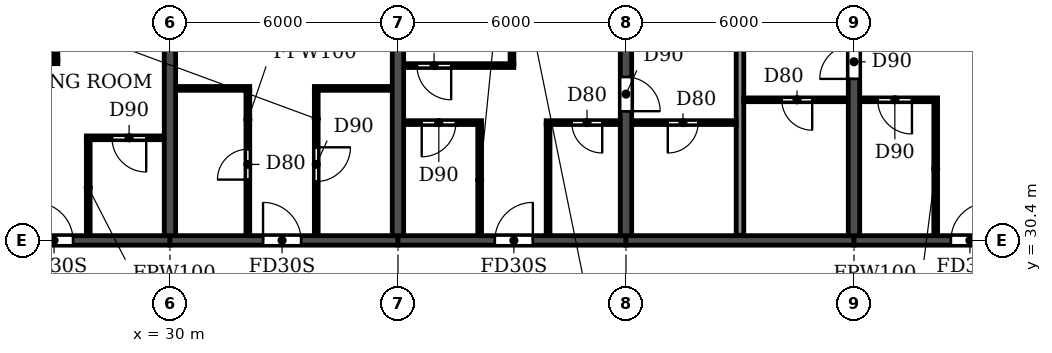
"""IFC4 building model, lengths in metres.
Left out: names, types, materials, properties, quantities, classifications, styles, units other than length and angle.
Written with IfcOpenShell. Run it as: python <this file> out.ifc"""

import sys

from ifc_helpers import new_model, si_unit, direction, frame, frame_2d, origin, place, context, subcontext, project, spatial, rectangle, extrude, element, fill, save


model = new_model("IFC4")
c1 = context("Model", 3, precision=1e-05, world=origin(), true_north=direction((0.0, 1.0)))
c2 = subcontext(c1, "Body", "Model", "MODEL_VIEW")
j1 = project(units=[si_unit("LENGTHUNIT", "METRE"), si_unit("PLANEANGLEUNIT", "RADIAN")], contexts=[c1])
p1 = place(None, origin())
s1 = spatial("IfcSite", under=j1, at=p1, CompositionType="ELEMENT")
p2 = place(p1, origin())
s2 = spatial("IfcBuilding", under=s1, at=p2, CompositionType="ELEMENT")
p3 = place(p2, frame((0.0, 0.0, 125.7)))
s3 = spatial("IfcBuildingStorey", under=s2, at=p3, CompositionType="ELEMENT", Elevation=125.7)
for number, where, z_axis, x_axis in (
    (1, (30.0, 30.525, 0.0), (0.0, 0.0, 1.0), (0.0, 1.0, 0.0)),
    (2, (36.0, 30.525, 0.0), (0.0, 0.0, 1.0), (0.0, 1.0, 0.0)),
):
    element("IfcWall", number, at=place(p3, frame(where, z_axis=z_axis, x_axis=x_axis)), inside=s3, PredefinedType="SHEAR", context=c2, shape_type="SweptSolid", body=[
        extrude(rectangle(XDim=11.675, YDim=0.3, at=frame_2d((5.837, 0.0))), origin(), (0.0, 0.0, 1.0), 3.07),
    ])
p4 = place(p3, frame((42.0, 30.525, 0.0), z_axis=(0.0, 0.0, 1.0), x_axis=(0.0, 1.0, 0.0)))
e3 = element("IfcWall", 3, at=p4, inside=s3, PredefinedType="SHEAR", context=c2, shape_type="SweptSolid", body=[
    extrude(rectangle(XDim=11.675, YDim=0.3, at=frame_2d((5.837, 0.0))), origin(), (0.0, 0.0, 1.0), 3.07),
])
p5 = place(p4, frame((3.275, 0.0, 0.0)))
e4 = element("IfcOpeningElement", 4, at=p5, cuts=e3, PredefinedType="OPENING", context=c2, shape_type="SweptSolid", body=[
    extrude(rectangle(XDim=0.9, YDim=2.1, at=frame_2d((0.45, 1.05))), frame((0.0, 0.16, 0.0), z_axis=(0.0, -1.0, 0.0), x_axis=(1.0, 0.0, 0.0)), (0.0, 0.0, 1.0), 0.32),
])
p6 = place(p3, frame((48.0, 30.525, 0.0), z_axis=(0.0, 0.0, 1.0), x_axis=(0.0, 1.0, 0.0)))
e5 = element("IfcWall", 5, at=p6, inside=s3, PredefinedType="SHEAR", context=c2, shape_type="SweptSolid", body=[
    extrude(rectangle(XDim=11.675, YDim=0.3, at=frame_2d((5.837, 0.0))), origin(), (0.0, 0.0, 1.0), 3.07),
])
p7 = place(p6, frame((4.125, 0.0, 0.0)))
e6 = element("IfcOpeningElement", 6, at=p7, cuts=e5, PredefinedType="OPENING", context=c2, shape_type="SweptSolid", body=[
    extrude(rectangle(XDim=0.9, YDim=2.1, at=frame_2d((0.45, 1.05))), frame((0.0, 0.16, 0.0), z_axis=(0.0, -1.0, 0.0), x_axis=(1.0, 0.0, 0.0)), (0.0, 0.0, 1.0), 0.32),
])
p8 = place(p3, frame((24.0, 30.4, 0.0), z_axis=(0.0, 0.0, 1.0), x_axis=(1.0, 0.0, 0.0)))
e7 = element("IfcWall", 7, at=p8, inside=s3, PredefinedType="SHEAR", context=c2, shape_type="SweptSolid", body=[
    extrude(rectangle(XDim=6.0, YDim=0.25, at=frame_2d((3.0, 0.0))), origin(), (0.0, 0.0, 1.0), 2.47),
])
p9 = place(p8, frame((2.45, 0.0, 0.0)))
e8 = element("IfcOpeningElement", 8, at=p9, cuts=e7, PredefinedType="OPENING", context=c2, shape_type="SweptSolid", body=[
    extrude(rectangle(XDim=1.0, YDim=2.1, at=frame_2d((0.5, 1.05))), frame((0.0, 0.135, 0.0), z_axis=(0.0, -1.0, 0.0), x_axis=(1.0, 0.0, 0.0)), (0.0, 0.0, 1.0), 0.27),
])
p10 = place(p3, frame((30.0, 30.4, 0.0), z_axis=(0.0, 0.0, 1.0), x_axis=(1.0, 0.0, 0.0)))
e9 = element("IfcWall", 9, at=p10, inside=s3, PredefinedType="SHEAR", context=c2, shape_type="SweptSolid", body=[
    extrude(rectangle(XDim=6.0, YDim=0.25, at=frame_2d((3.0, 0.0))), origin(), (0.0, 0.0, 1.0), 2.47),
])
p11 = place(p10, frame((2.45, 0.0, 0.0)))
e10 = element("IfcOpeningElement", 10, at=p11, cuts=e9, PredefinedType="OPENING", context=c2, shape_type="SweptSolid", body=[
    extrude(rectangle(XDim=1.0, YDim=2.1, at=frame_2d((0.5, 1.05))), frame((0.0, 0.135, 0.0), z_axis=(0.0, -1.0, 0.0), x_axis=(1.0, 0.0, 0.0)), (0.0, 0.0, 1.0), 0.27),
])
p12 = place(p3, frame((36.0, 30.4, 0.0), z_axis=(0.0, 0.0, 1.0), x_axis=(1.0, 0.0, 0.0)))
e11 = element("IfcWall", 11, at=p12, inside=s3, PredefinedType="SHEAR", context=c2, shape_type="SweptSolid", body=[
    extrude(rectangle(XDim=6.0, YDim=0.25, at=frame_2d((3.0, 0.0))), origin(), (0.0, 0.0, 1.0), 2.47),
])
p13 = place(p12, frame((2.55, 0.0, 0.0)))
e12 = element("IfcOpeningElement", 12, at=p13, cuts=e11, PredefinedType="OPENING", context=c2, shape_type="SweptSolid", body=[
    extrude(rectangle(XDim=1.0, YDim=2.1, at=frame_2d((0.5, 1.05))), frame((0.0, 0.135, 0.0), z_axis=(0.0, -1.0, 0.0), x_axis=(1.0, 0.0, 0.0)), (0.0, 0.0, 1.0), 0.27),
])
p14 = place(p3, frame((42.0, 30.4, 0.0), z_axis=(0.0, 0.0, 1.0), x_axis=(1.0, 0.0, 0.0)))
e13 = element("IfcWall", 13, at=p14, inside=s3, PredefinedType="SHEAR", context=c2, shape_type="SweptSolid", body=[
    extrude(rectangle(XDim=6.0, YDim=0.25, at=frame_2d((3.0, 0.0))), origin(), (0.0, 0.0, 1.0), 2.47),
])
p15 = place(p3, frame((48.0, 30.4, 0.0), z_axis=(0.0, 0.0, 1.0), x_axis=(1.0, 0.0, 0.0)))
e14 = element("IfcWall", 14, at=p15, inside=s3, PredefinedType="SHEAR", context=c2, shape_type="SweptSolid", body=[
    extrude(rectangle(XDim=6.0, YDim=0.25, at=frame_2d((3.0, 0.0))), origin(), (0.0, 0.0, 1.0), 2.47),
])
p16 = place(p15, frame((2.55, 0.0, 0.0)))
e15 = element("IfcOpeningElement", 15, at=p16, cuts=e14, PredefinedType="OPENING", context=c2, shape_type="SweptSolid", body=[
    extrude(rectangle(XDim=1.0, YDim=2.1, at=frame_2d((0.5, 1.05))), frame((0.0, 0.135, 0.0), z_axis=(0.0, -1.0, 0.0), x_axis=(1.0, 0.0, 0.0)), (0.0, 0.0, 1.0), 0.27),
])
p17 = place(p3, frame((45.0, 30.535, 0.0), z_axis=(0.0, 0.0, 1.0), x_axis=(0.0, 1.0, 0.0)))
e16 = element("IfcWall", 16, at=p17, inside=s3, PredefinedType="PARTITIONING", context=c2, shape_type="SweptSolid", body=[
    extrude(rectangle(XDim=11.805, YDim=0.2, at=frame_2d((5.903, 0.0))), origin(), (0.0, 0.0, 1.0), 3.07),
])
p18 = place(p3, frame((27.8, 33.1, 0.0), z_axis=(0.0, 0.0, 1.0), x_axis=(1.0, 0.0, 0.0)))
e17 = element("IfcWall", 17, at=p18, inside=s3, PredefinedType="PARTITIONING", context=c2, shape_type="SweptSolid", body=[
    extrude(rectangle(XDim=2.04, YDim=0.1, at=frame_2d((1.02, 0.0))), origin(), (0.0, 0.0, 1.0), 3.07),
])
p19 = place(p18, frame((0.675, 0.0, 0.0)))
e18 = element("IfcOpeningElement", 18, at=p19, cuts=e17, PredefinedType="OPENING", context=c2, shape_type="SweptSolid", body=[
    extrude(rectangle(XDim=0.9, YDim=2.1, at=frame_2d((0.45, 1.05))), frame((0.0, 0.06, 0.0), z_axis=(0.0, -1.0, 0.0), x_axis=(1.0, 0.0, 0.0)), (0.0, 0.0, 1.0), 0.12),
])
p20 = place(p3, frame((36.16, 33.5, 0.0), z_axis=(0.0, 0.0, 1.0), x_axis=(1.0, 0.0, 0.0)))
e19 = element("IfcWall", 19, at=p20, inside=s3, PredefinedType="PARTITIONING", context=c2, shape_type="SweptSolid", body=[
    extrude(rectangle(XDim=2.04, YDim=0.1, at=frame_2d((1.02, 0.0))), origin(), (0.0, 0.0, 1.0), 3.07),
])
p21 = place(p20, frame((0.465, 0.0, 0.0)))
e20 = element("IfcOpeningElement", 20, at=p21, cuts=e19, PredefinedType="OPENING", context=c2, shape_type="SweptSolid", body=[
    extrude(rectangle(XDim=0.9, YDim=2.1, at=frame_2d((0.45, 1.05))), frame((0.0, 0.06, 0.0), z_axis=(0.0, -1.0, 0.0), x_axis=(1.0, 0.0, 0.0)), (0.0, 0.0, 1.0), 0.12),
])
p22 = place(p3, frame((39.9, 33.5, 0.0), z_axis=(0.0, 0.0, 1.0), x_axis=(1.0, 0.0, 0.0)))
e21 = element("IfcWall", 21, at=p22, inside=s3, PredefinedType="PARTITIONING", context=c2, shape_type="SweptSolid", body=[
    extrude(rectangle(XDim=1.94, YDim=0.1, at=frame_2d((0.97, 0.0))), origin(), (0.0, 0.0, 1.0), 3.07),
])
p23 = place(p22, frame((0.675, 0.0, 0.0)))
e22 = element("IfcOpeningElement", 22, at=p23, cuts=e21, PredefinedType="OPENING", context=c2, shape_type="SweptSolid", body=[
    extrude(rectangle(XDim=0.8, YDim=2.1, at=frame_2d((0.4, 1.05))), frame((0.0, 0.06, 0.0), z_axis=(0.0, -1.0, 0.0), x_axis=(1.0, 0.0, 0.0)), (0.0, 0.0, 1.0), 0.12),
])
p24 = place(p3, frame((42.16, 33.5, 0.0), z_axis=(0.0, 0.0, 1.0), x_axis=(1.0, 0.0, 0.0)))
e23 = element("IfcWall", 23, at=p24, inside=s3, PredefinedType="PARTITIONING", context=c2, shape_type="SweptSolid", body=[
    extrude(rectangle(XDim=2.74, YDim=0.1, at=frame_2d((1.37, 0.0))), origin(), (0.0, 0.0, 1.0), 3.07),
])
p25 = place(p24, frame((0.94, 0.0, 0.0)))
e24 = element("IfcOpeningElement", 24, at=p25, cuts=e23, PredefinedType="OPENING", context=c2, shape_type="SweptSolid", body=[
    extrude(rectangle(XDim=0.8, YDim=2.1, at=frame_2d((0.4, 1.05))), frame((0.0, 0.06, 0.0), z_axis=(0.0, -1.0, 0.0), x_axis=(1.0, 0.0, 0.0)), (0.0, 0.0, 1.0), 0.12),
])
p26 = place(p3, frame((45.1, 34.1, 0.0), z_axis=(0.0, 0.0, 1.0), x_axis=(1.0, 0.0, 0.0)))
e25 = element("IfcWall", 25, at=p26, inside=s3, PredefinedType="PARTITIONING", context=c2, shape_type="SweptSolid", body=[
    extrude(rectangle(XDim=2.74, YDim=0.1, at=frame_2d((1.37, 0.0))), origin(), (0.0, 0.0, 1.0), 3.07),
])
p27 = place(p26, frame((1.0, 0.0, 0.0)))
e26 = element("IfcOpeningElement", 26, at=p27, cuts=e25, PredefinedType="OPENING", context=c2, shape_type="SweptSolid", body=[
    extrude(rectangle(XDim=0.8, YDim=2.1, at=frame_2d((0.4, 1.05))), frame((0.0, 0.06, 0.0), z_axis=(0.0, -1.0, 0.0), x_axis=(1.0, 0.0, 0.0)), (0.0, 0.0, 1.0), 0.12),
])
p28 = place(p3, frame((48.16, 34.1, 0.0), z_axis=(0.0, 0.0, 1.0), x_axis=(1.0, 0.0, 0.0)))
e27 = element("IfcWall", 27, at=p28, inside=s3, PredefinedType="PARTITIONING", context=c2, shape_type="SweptSolid", body=[
    extrude(rectangle(XDim=2.04, YDim=0.1, at=frame_2d((1.02, 0.0))), origin(), (0.0, 0.0, 1.0), 3.07),
])
p29 = place(p28, frame((0.465, 0.0, 0.0)))
e28 = element("IfcOpeningElement", 28, at=p29, cuts=e27, PredefinedType="OPENING", context=c2, shape_type="SweptSolid", body=[
    extrude(rectangle(XDim=0.9, YDim=2.1, at=frame_2d((0.45, 1.05))), frame((0.0, 0.06, 0.0), z_axis=(0.0, -1.0, 0.0), x_axis=(1.0, 0.0, 0.0)), (0.0, 0.0, 1.0), 0.12),
])
p30 = place(p3, frame((30.16, 34.4, 0.0), z_axis=(0.0, 0.0, 1.0), x_axis=(1.0, 0.0, 0.0)))
e29 = element("IfcWall", 29, at=p30, inside=s3, PredefinedType="PARTITIONING", context=c2, shape_type="SweptSolid", body=[
    extrude(rectangle(XDim=1.94, YDim=0.1, at=frame_2d((0.97, 0.0))), origin(), (0.0, 0.0, 1.0), 3.07),
])
p31 = place(p3, frame((33.8, 34.4, 0.0), z_axis=(0.0, 0.0, 1.0), x_axis=(1.0, 0.0, 0.0)))
e30 = element("IfcWall", 30, at=p31, inside=s3, PredefinedType="PARTITIONING", context=c2, shape_type="SweptSolid", body=[
    extrude(rectangle(XDim=2.04, YDim=0.1, at=frame_2d((1.02, 0.0))), origin(), (0.0, 0.0, 1.0), 3.07),
])
p32 = place(p3, frame((36.16, 35.0, 0.0), z_axis=(0.0, 0.0, 1.0), x_axis=(1.0, 0.0, 0.0)))
e31 = element("IfcWall", 31, at=p32, inside=s3, PredefinedType="PARTITIONING", context=c2, shape_type="SweptSolid", body=[
    extrude(rectangle(XDim=2.89, YDim=0.1, at=frame_2d((1.445, 0.0))), origin(), (0.0, 0.0, 1.0), 3.07),
])
p33 = place(p32, frame((0.34, 0.0, 0.0)))
e32 = element("IfcOpeningElement", 32, at=p33, cuts=e31, PredefinedType="OPENING", context=c2, shape_type="SweptSolid", body=[
    extrude(rectangle(XDim=0.9, YDim=2.1, at=frame_2d((0.45, 1.05))), frame((0.0, 0.06, 0.0), z_axis=(0.0, -1.0, 0.0), x_axis=(1.0, 0.0, 0.0)), (0.0, 0.0, 1.0), 0.12),
])
p34 = place(p3, frame((24.16, 35.1, 0.0), z_axis=(0.0, 0.0, 1.0), x_axis=(1.0, 0.0, 0.0)))
e33 = element("IfcWall", 33, at=p34, inside=s3, PredefinedType="PARTITIONING", context=c2, shape_type="SweptSolid", body=[
    extrude(rectangle(XDim=2.89, YDim=0.1, at=frame_2d((1.445, 0.0))), origin(), (0.0, 0.0, 1.0), 3.07),
])
p35 = place(p34, frame((0.34, 0.0, 0.0)))
e34 = element("IfcOpeningElement", 34, at=p35, cuts=e33, PredefinedType="OPENING", context=c2, shape_type="SweptSolid", body=[
    extrude(rectangle(XDim=0.9, YDim=2.1, at=frame_2d((0.45, 1.05))), frame((0.0, 0.06, 0.0), z_axis=(0.0, -1.0, 0.0), x_axis=(1.0, 0.0, 0.0)), (0.0, 0.0, 1.0), 0.12),
])
p36 = place(p3, frame((27.0, 35.15, 0.0), z_axis=(0.0, 0.0, 1.0), x_axis=(0.0, 1.0, 0.0)))
e35 = element("IfcWall", 35, at=p36, inside=s3, PredefinedType="PARTITIONING", context=c2, shape_type="SweptSolid", body=[
    extrude(rectangle(XDim=7.19, YDim=0.1, at=frame_2d((3.595, 0.0))), origin(), (0.0, 0.0, 1.0), 3.07),
])
p37 = place(p3, frame((27.85, 30.535, 0.0), z_axis=(0.0, 0.0, 1.0), x_axis=(0.0, 1.0, 0.0)))
e36 = element("IfcWall", 36, at=p37, inside=s3, PredefinedType="PARTITIONING", context=c2, shape_type="SweptSolid", body=[
    extrude(rectangle(XDim=2.515, YDim=0.1, at=frame_2d((1.258, 0.0))), origin(), (0.0, 0.0, 1.0), 3.07),
])
p38 = place(p3, frame((32.05, 30.535, 0.0), z_axis=(0.0, 0.0, 1.0), x_axis=(0.0, 1.0, 0.0)))
e37 = element("IfcWall", 37, at=p38, inside=s3, PredefinedType="PARTITIONING", context=c2, shape_type="SweptSolid", body=[
    extrude(rectangle(XDim=3.815, YDim=0.1, at=frame_2d((1.908, 0.0))), origin(), (0.0, 0.0, 1.0), 3.07),
])
p39 = place(p38, frame((1.465, 0.0, 0.0)))
e38 = element("IfcOpeningElement", 38, at=p39, cuts=e37, PredefinedType="OPENING", context=c2, shape_type="SweptSolid", body=[
    extrude(rectangle(XDim=0.8, YDim=2.1, at=frame_2d((0.4, 1.05))), frame((0.0, 0.06, 0.0), z_axis=(0.0, -1.0, 0.0), x_axis=(1.0, 0.0, 0.0)), (0.0, 0.0, 1.0), 0.12),
])
p40 = place(p3, frame((33.85, 30.535, 0.0), z_axis=(0.0, 0.0, 1.0), x_axis=(0.0, 1.0, 0.0)))
e39 = element("IfcWall", 39, at=p40, inside=s3, PredefinedType="PARTITIONING", context=c2, shape_type="SweptSolid", body=[
    extrude(rectangle(XDim=3.815, YDim=0.1, at=frame_2d((1.908, 0.0))), origin(), (0.0, 0.0, 1.0), 3.07),
])
p41 = place(p40, frame((1.415, 0.0, 0.0)))
e40 = element("IfcOpeningElement", 40, at=p41, cuts=e39, PredefinedType="OPENING", context=c2, shape_type="SweptSolid", body=[
    extrude(rectangle(XDim=0.9, YDim=2.1, at=frame_2d((0.45, 1.05))), frame((0.0, 0.06, 0.0), z_axis=(0.0, -1.0, 0.0), x_axis=(1.0, 0.0, 0.0)), (0.0, 0.0, 1.0), 0.12),
])
p42 = place(p3, frame((38.15, 30.535, 0.0), z_axis=(0.0, 0.0, 1.0), x_axis=(0.0, 1.0, 0.0)))
e41 = element("IfcWall", 41, at=p42, inside=s3, PredefinedType="PARTITIONING", context=c2, shape_type="SweptSolid", body=[
    extrude(rectangle(XDim=2.915, YDim=0.1, at=frame_2d((1.458, 0.0))), origin(), (0.0, 0.0, 1.0), 3.07),
])
p43 = place(p3, frame((39.0, 35.05, 0.0), z_axis=(0.0, 0.0, 1.0), x_axis=(0.0, 1.0, 0.0)))
e42 = element("IfcWall", 42, at=p43, inside=s3, PredefinedType="PARTITIONING", context=c2, shape_type="SweptSolid", body=[
    extrude(rectangle(XDim=7.29, YDim=0.1, at=frame_2d((3.645, 0.0))), origin(), (0.0, 0.0, 1.0), 3.07),
])
p44 = place(p3, frame((39.95, 30.535, 0.0), z_axis=(0.0, 0.0, 1.0), x_axis=(0.0, 1.0, 0.0)))
e43 = element("IfcWall", 43, at=p44, inside=s3, PredefinedType="PARTITIONING", context=c2, shape_type="SweptSolid", body=[
    extrude(rectangle(XDim=2.915, YDim=0.1, at=frame_2d((1.458, 0.0))), origin(), (0.0, 0.0, 1.0), 3.07),
])
p45 = place(p3, frame((50.15, 30.535, 0.0), z_axis=(0.0, 0.0, 1.0), x_axis=(0.0, 1.0, 0.0)))
e44 = element("IfcWall", 44, at=p45, inside=s3, PredefinedType="PARTITIONING", context=c2, shape_type="SweptSolid", body=[
    extrude(rectangle(XDim=3.515, YDim=0.1, at=frame_2d((1.758, 0.0))), origin(), (0.0, 0.0, 1.0), 3.07),
])
p46 = place(p9, origin())
e45 = element("IfcDoor", 45, at=p46, inside=s3, OperationType="SINGLE_SWING_LEFT", PredefinedType="DOOR", context=c2, shape_type="SweptSolid", body=[
    extrude(rectangle(XDim=1.0, YDim=2.1, at=frame_2d((0.5, 1.05))), frame((0.0, 0.025, 0.0), z_axis=(0.0, -1.0, 0.0), x_axis=(1.0, 0.0, 0.0)), (0.0, 0.0, 1.0), 0.05),
])
fill(e8, e45)
p47 = place(p19, frame((0.9, 0.0, 0.0), z_axis=(0.0, 0.0, 1.0), x_axis=(-1.0, 0.0, 0.0)))
e46 = element("IfcDoor", 46, at=p47, inside=s3, OperationType="SINGLE_SWING_LEFT", PredefinedType="DOOR", context=c2, shape_type="SweptSolid", body=[
    extrude(rectangle(XDim=0.9, YDim=2.1, at=frame_2d((0.45, 1.05))), frame((0.0, 0.025, 0.0), z_axis=(0.0, -1.0, 0.0), x_axis=(1.0, 0.0, 0.0)), (0.0, 0.0, 1.0), 0.05),
])
fill(e18, e46)
p48 = place(p39, origin())
e47 = element("IfcDoor", 47, at=p48, inside=s3, OperationType="SINGLE_SWING_LEFT", PredefinedType="DOOR", context=c2, shape_type="SweptSolid", body=[
    extrude(rectangle(XDim=0.8, YDim=2.1, at=frame_2d((0.4, 1.05))), frame((0.0, 0.025, 0.0), z_axis=(0.0, -1.0, 0.0), x_axis=(1.0, 0.0, 0.0)), (0.0, 0.0, 1.0), 0.05),
])
fill(e38, e47)
p49 = place(p11, origin())
e48 = element("IfcDoor", 48, at=p49, inside=s3, OperationType="SINGLE_SWING_LEFT", PredefinedType="DOOR", context=c2, shape_type="SweptSolid", body=[
    extrude(rectangle(XDim=1.0, YDim=2.1, at=frame_2d((0.5, 1.05))), frame((0.0, 0.025, 0.0), z_axis=(0.0, -1.0, 0.0), x_axis=(1.0, 0.0, 0.0)), (0.0, 0.0, 1.0), 0.05),
])
fill(e10, e48)
p50 = place(p41, frame((0.9, 0.0, 0.0), z_axis=(0.0, 0.0, 1.0), x_axis=(-1.0, 0.0, 0.0)))
e49 = element("IfcDoor", 49, at=p50, inside=s3, OperationType="SINGLE_SWING_LEFT", PredefinedType="DOOR", context=c2, shape_type="SweptSolid", body=[
    extrude(rectangle(XDim=0.9, YDim=2.1, at=frame_2d((0.45, 1.05))), frame((0.0, 0.025, 0.0), z_axis=(0.0, -1.0, 0.0), x_axis=(1.0, 0.0, 0.0)), (0.0, 0.0, 1.0), 0.05),
])
fill(e40, e49)
p51 = place(p25, frame((0.8, 0.0, 0.0), z_axis=(0.0, 0.0, 1.0), x_axis=(-1.0, 0.0, 0.0)))
e50 = element("IfcDoor", 50, at=p51, inside=s3, OperationType="SINGLE_SWING_RIGHT", PredefinedType="DOOR", context=c2, shape_type="SweptSolid", body=[
    extrude(rectangle(XDim=0.8, YDim=2.1, at=frame_2d((0.4, 1.05))), frame((0.0, 0.025, 0.0), z_axis=(0.0, -1.0, 0.0), x_axis=(1.0, 0.0, 0.0)), (0.0, 0.0, 1.0), 0.05),
])
fill(e24, e50)
p52 = place(p33, frame((0.9, 0.0, 0.0), z_axis=(0.0, 0.0, 1.0), x_axis=(-1.0, 0.0, 0.0)))
e51 = element("IfcDoor", 51, at=p52, inside=s3, OperationType="SINGLE_SWING_LEFT", PredefinedType="DOOR", context=c2, shape_type="SweptSolid", body=[
    extrude(rectangle(XDim=0.9, YDim=2.1, at=frame_2d((0.45, 1.05))), frame((0.0, 0.025, 0.0), z_axis=(0.0, -1.0, 0.0), x_axis=(1.0, 0.0, 0.0)), (0.0, 0.0, 1.0), 0.05),
])
fill(e32, e51)
p53 = place(p21, frame((0.9, 0.0, 0.0), z_axis=(0.0, 0.0, 1.0), x_axis=(-1.0, 0.0, 0.0)))
e52 = element("IfcDoor", 52, at=p53, inside=s3, OperationType="SINGLE_SWING_RIGHT", PredefinedType="DOOR", context=c2, shape_type="SweptSolid", body=[
    extrude(rectangle(XDim=0.9, YDim=2.1, at=frame_2d((0.45, 1.05))), frame((0.0, 0.025, 0.0), z_axis=(0.0, -1.0, 0.0), x_axis=(1.0, 0.0, 0.0)), (0.0, 0.0, 1.0), 0.05),
])
fill(e20, e52)
p54 = place(p13, origin())
e53 = element("IfcDoor", 53, at=p54, inside=s3, OperationType="SINGLE_SWING_RIGHT", PredefinedType="DOOR", context=c2, shape_type="SweptSolid", body=[
    extrude(rectangle(XDim=1.0, YDim=2.1, at=frame_2d((0.5, 1.05))), frame((0.0, 0.025, 0.0), z_axis=(0.0, -1.0, 0.0), x_axis=(1.0, 0.0, 0.0)), (0.0, 0.0, 1.0), 0.05),
])
fill(e12, e53)
p55 = place(p23, frame((0.8, 0.0, 0.0), z_axis=(0.0, 0.0, 1.0), x_axis=(-1.0, 0.0, 0.0)))
e54 = element("IfcDoor", 54, at=p55, inside=s3, OperationType="SINGLE_SWING_LEFT", PredefinedType="DOOR", context=c2, shape_type="SweptSolid", body=[
    extrude(rectangle(XDim=0.8, YDim=2.1, at=frame_2d((0.4, 1.05))), frame((0.0, 0.025, 0.0), z_axis=(0.0, -1.0, 0.0), x_axis=(1.0, 0.0, 0.0)), (0.0, 0.0, 1.0), 0.05),
])
fill(e22, e54)
p56 = place(p5, frame((0.9, 0.0, 0.0), z_axis=(0.0, 0.0, 1.0), x_axis=(-1.0, 0.0, 0.0)))
e55 = element("IfcDoor", 55, at=p56, inside=s3, OperationType="SINGLE_SWING_RIGHT", PredefinedType="DOOR", context=c2, shape_type="SweptSolid", body=[
    extrude(rectangle(XDim=0.9, YDim=2.1, at=frame_2d((0.45, 1.05))), frame((0.0, 0.025, 0.0), z_axis=(0.0, -1.0, 0.0), x_axis=(1.0, 0.0, 0.0)), (0.0, 0.0, 1.0), 0.05),
])
fill(e4, e55)
p57 = place(p27, frame((0.8, 0.0, 0.0), z_axis=(0.0, 0.0, 1.0), x_axis=(-1.0, 0.0, 0.0)))
e56 = element("IfcDoor", 56, at=p57, inside=s3, OperationType="SINGLE_SWING_LEFT", PredefinedType="DOOR", context=c2, shape_type="SweptSolid", body=[
    extrude(rectangle(XDim=0.8, YDim=2.1, at=frame_2d((0.4, 1.05))), frame((0.0, 0.025, 0.0), z_axis=(0.0, -1.0, 0.0), x_axis=(1.0, 0.0, 0.0)), (0.0, 0.0, 1.0), 0.05),
])
fill(e26, e56)
p58 = place(p7, origin())
e57 = element("IfcDoor", 57, at=p58, inside=s3, OperationType="SINGLE_SWING_LEFT", PredefinedType="DOOR", context=c2, shape_type="SweptSolid", body=[
    extrude(rectangle(XDim=0.9, YDim=2.1, at=frame_2d((0.45, 1.05))), frame((0.0, 0.025, 0.0), z_axis=(0.0, -1.0, 0.0), x_axis=(1.0, 0.0, 0.0)), (0.0, 0.0, 1.0), 0.05),
])
fill(e6, e57)
p59 = place(p29, frame((0.9, 0.0, 0.0), z_axis=(0.0, 0.0, 1.0), x_axis=(-1.0, 0.0, 0.0)))
e58 = element("IfcDoor", 58, at=p59, inside=s3, OperationType="SINGLE_SWING_LEFT", PredefinedType="DOOR", context=c2, shape_type="SweptSolid", body=[
    extrude(rectangle(XDim=0.9, YDim=2.1, at=frame_2d((0.45, 1.05))), frame((0.0, 0.025, 0.0), z_axis=(0.0, -1.0, 0.0), x_axis=(1.0, 0.0, 0.0)), (0.0, 0.0, 1.0), 0.05),
])
fill(e28, e58)
p60 = place(p16, origin())
e59 = element("IfcDoor", 59, at=p60, inside=s3, OperationType="SINGLE_SWING_RIGHT", PredefinedType="DOOR", context=c2, shape_type="SweptSolid", body=[
    extrude(rectangle(XDim=1.0, YDim=2.1, at=frame_2d((0.5, 1.05))), frame((0.0, 0.025, 0.0), z_axis=(0.0, -1.0, 0.0), x_axis=(1.0, 0.0, 0.0)), (0.0, 0.0, 1.0), 0.05),
])
fill(e15, e59)
save(model, sys.argv[1])
